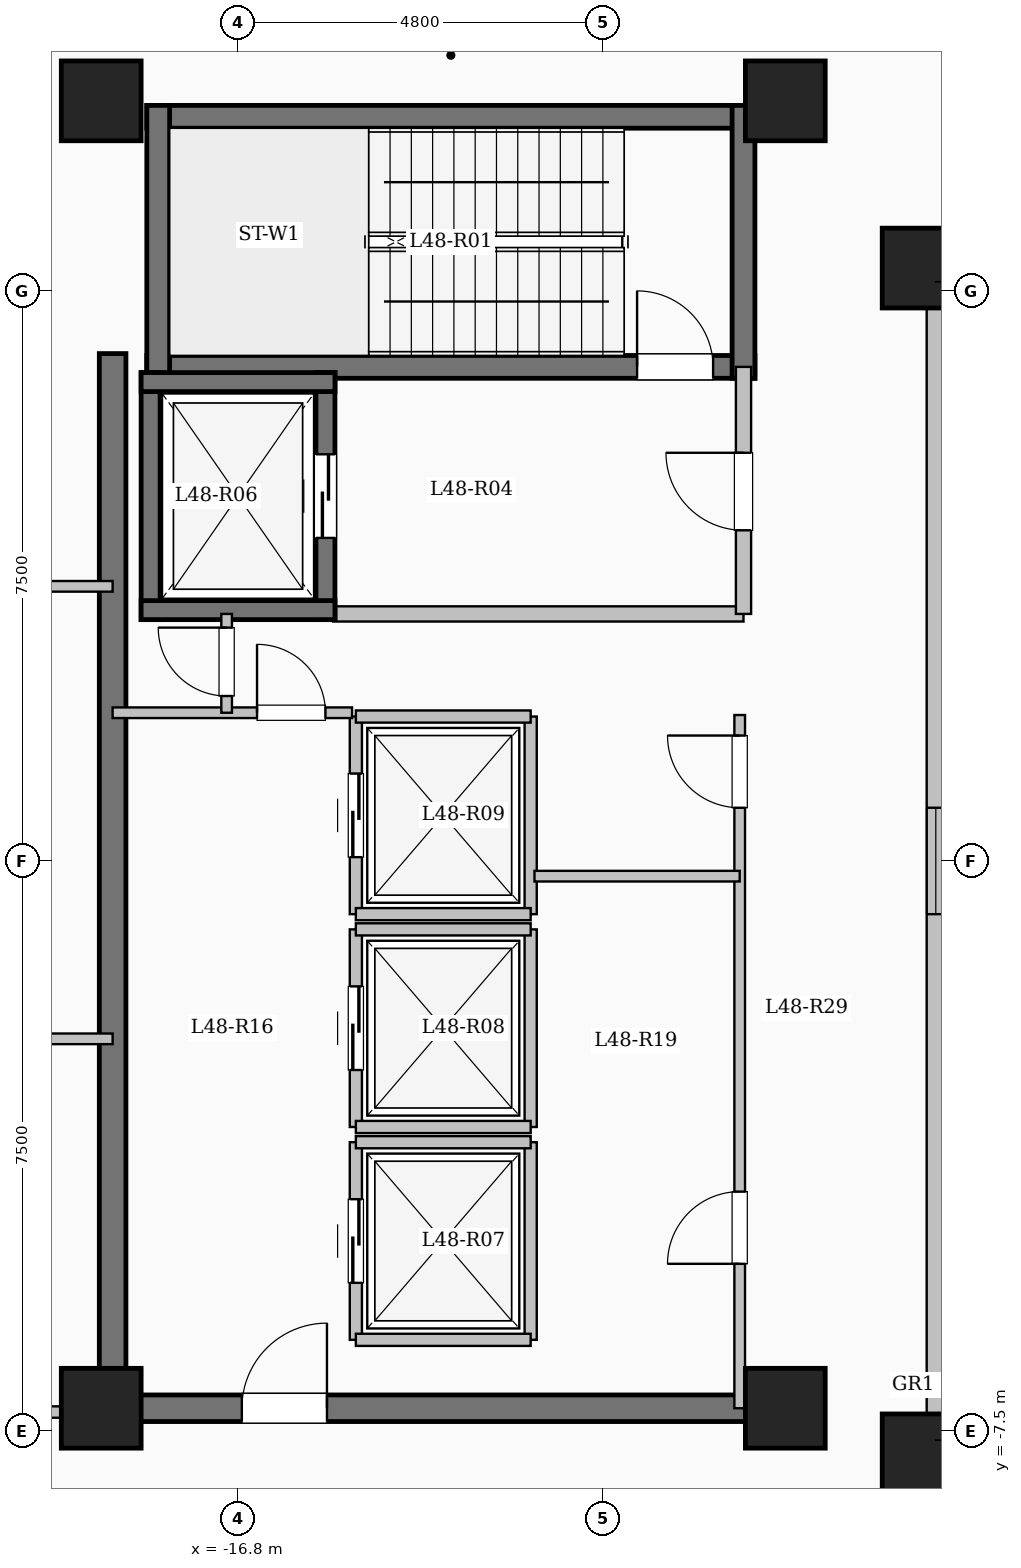
"""IFC4 building model, lengths in metres.
Left out: names, types, materials, properties, quantities, classifications, styles, units other than length and angle.
Written with IfcOpenShell. Run it as: python <this file> out.ifc"""

import sys

from ifc_helpers import new_model, si_unit, direction, frame, frame_2d, origin, origin_2d, place, context, subcontext, project, spatial, rectangle, extrude, element, fill, save


model = new_model("IFC4")
c1 = context("Model", 3, precision=1e-05, world=origin(), true_north=direction((0.0, 1.0)))
c2 = subcontext(c1, "Body", "Model", "MODEL_VIEW")
j1 = project(units=[si_unit("LENGTHUNIT", "METRE"), si_unit("PLANEANGLEUNIT", "RADIAN")], contexts=[c1])
p1 = place(None, origin())
s1 = spatial("IfcSite", under=j1, at=p1, CompositionType="ELEMENT")
p2 = place(p1, origin())
s2 = spatial("IfcBuilding", under=s1, at=p2, CompositionType="ELEMENT")
p3 = place(p2, frame((0.0, 0.0, 177.3)))
s3 = spatial("IfcBuildingStorey", under=s2, at=p3, CompositionType="ELEMENT", Elevation=177.3)
for number, where, z_axis, x_axis in (
    (1, (-7.8, -7.8, 0.0), (0.0, 0.0, 1.0), (1.0, 0.0, 0.0)),
    (2, (-7.8, 7.8, 0.0), (0.0, 0.0, 1.0), (1.0, 0.0, 0.0)),
    (3, (-9.6, -7.2, 0.0), (0.0, 0.0, 1.0), (1.0, 0.0, 0.0)),
    (4, (-9.6, 10.0, 0.0), (0.0, 0.0, 1.0), (1.0, 0.0, 0.0)),
    (5, (-18.6, -7.2, 0.0), (0.0, 0.0, 1.0), (1.0, 0.0, 0.0)),
    (6, (-18.6, 10.0, 0.0), (0.0, 0.0, 1.0), (1.0, 0.0, 0.0)),
):
    element("IfcColumn", number, at=place(p3, frame(where, z_axis=z_axis, x_axis=x_axis)), inside=s3, PredefinedType="COLUMN", context=c2, shape_type="SweptSolid", body=[
        extrude(rectangle(XDim=1.05, YDim=1.05, at=origin_2d()), origin(), (0.0, 0.0, 1.0), 4.5),
    ])
p4 = place(p3, frame((-7.62, 7.62, 0.0), z_axis=(0.0, 0.0, 1.0), x_axis=(0.0, -1.0, 0.0)))
e7 = element("IfcWall", 7, at=p4, inside=s3, PredefinedType="SOLIDWALL", context=c2, shape_type="SweptSolid", body=[
    extrude(rectangle(XDim=15.24, YDim=0.24, at=frame_2d((7.62, 0.0))), origin(), (0.0, 0.0, 1.0), 4.2),
])
p5 = place(p4, frame((6.92, 0.0, 0.95)))
e8 = element("IfcOpeningElement", 8, at=p5, cuts=e7, PredefinedType="OPENING", context=c2, shape_type="SweptSolid", body=[
    extrude(rectangle(XDim=1.4, YDim=1.5, at=frame_2d((0.7, 0.75))), frame((0.0, 0.13, 0.0), z_axis=(0.0, -1.0, 0.0), x_axis=(1.0, 0.0, 0.0)), (0.0, 0.0, 1.0), 0.26),
])
p6 = place(p3, frame((-18.0, 9.79, 0.0), z_axis=(0.0, 0.0, 1.0), x_axis=(1.0, 0.0, 0.0)))
e9 = element("IfcWall", 9, at=p6, inside=s3, PredefinedType="SHEAR", context=c2, shape_type="SweptSolid", body=[
    extrude(rectangle(XDim=8.0, YDim=0.3, at=frame_2d((4.0, 0.0))), origin(), (0.0, 0.0, 1.0), 4.5),
])
p7 = place(p3, frame((-18.0, 6.5, 0.0), z_axis=(0.0, 0.0, 1.0), x_axis=(1.0, 0.0, 0.0)))
e10 = element("IfcWall", 10, at=p7, inside=s3, PredefinedType="SHEAR", context=c2, shape_type="SweptSolid", body=[
    extrude(rectangle(XDim=8.0, YDim=0.3, at=frame_2d((4.0, 0.0))), origin(), (0.0, 0.0, 1.0), 4.5),
])
p8 = place(p7, frame((6.45, 0.0, 0.0)))
e11 = element("IfcOpeningElement", 11, at=p8, cuts=e10, PredefinedType="OPENING", context=c2, shape_type="SweptSolid", body=[
    extrude(rectangle(XDim=1.0, YDim=2.15, at=frame_2d((0.5, 1.075))), frame((0.0, 0.16, 0.0), z_axis=(0.0, -1.0, 0.0), x_axis=(1.0, 0.0, 0.0)), (0.0, 0.0, 1.0), 0.32),
])
for number, where, z_axis, x_axis in (
    (12, (-17.85, 6.35, 0.0), (0.0, 0.0, 1.0), (0.0, 1.0, 0.0)),
    (13, (-10.15, 6.35, 0.0), (0.0, 0.0, 1.0), (0.0, 1.0, 0.0)),
):
    element("IfcWall", number, at=place(p3, frame(where, z_axis=z_axis, x_axis=x_axis)), inside=s3, PredefinedType="SHEAR", context=c2, shape_type="SweptSolid", body=[
        extrude(rectangle(XDim=3.59, YDim=0.3, at=frame_2d((1.795, 0.0))), origin(), (0.0, 0.0, 1.0), 4.5),
    ])
p9 = place(p3, frame((-15.55, 3.25, 0.0), z_axis=(0.0, 0.0, 1.0), x_axis=(1.0, 0.0, 0.0)))
e14 = element("IfcWall", 14, at=p9, inside=s3, PredefinedType="SOLIDWALL", context=c2, shape_type="SweptSolid", body=[
    extrude(rectangle(XDim=5.4, YDim=0.2, at=frame_2d((2.7, 0.0))), origin(), (0.0, 0.0, 1.0), 4.2),
])
p10 = place(p3, frame((-10.15, 3.25, 0.0), z_axis=(0.0, 0.0, 1.0), x_axis=(0.0, 1.0, 0.0)))
e15 = element("IfcWall", 15, at=p10, inside=s3, PredefinedType="SOLIDWALL", context=c2, shape_type="SweptSolid", body=[
    extrude(rectangle(XDim=3.25, YDim=0.2, at=frame_2d((1.625, 0.0))), origin(), (0.0, 0.0, 1.0), 4.2),
])
p11 = place(p10, frame((1.1, 0.0, 0.0)))
e16 = element("IfcOpeningElement", 16, at=p11, cuts=e15, PredefinedType="OPENING", context=c2, shape_type="SweptSolid", body=[
    extrude(rectangle(XDim=1.02, YDim=2.15, at=frame_2d((0.51, 1.075))), frame((0.0, 0.11, 0.0), z_axis=(0.0, -1.0, 0.0), x_axis=(1.0, 0.0, 0.0)), (0.0, 0.0, 1.0), 0.22),
])
p12 = place(p3, frame((-17.95, 3.175, 0.0), z_axis=(0.0, 0.0, 1.0), x_axis=(0.0, 1.0, 0.0)))
e17 = element("IfcWall", 17, at=p12, inside=s3, PredefinedType="SHEAR", context=c2, shape_type="SweptSolid", body=[
    extrude(rectangle(XDim=3.25, YDim=0.25, at=frame_2d((1.625, 0.0))), origin(), (0.0, 0.0, 1.0), 4.5),
])
p13 = place(p3, frame((-15.65, 3.175, 0.0), z_axis=(0.0, 0.0, 1.0), x_axis=(0.0, 1.0, 0.0)))
e18 = element("IfcWall", 18, at=p13, inside=s3, PredefinedType="SHEAR", context=c2, shape_type="SweptSolid", body=[
    extrude(rectangle(XDim=3.25, YDim=0.25, at=frame_2d((1.625, 0.0))), origin(), (0.0, 0.0, 1.0), 4.5),
])
p14 = place(p13, frame((1.075, 0.0, 0.0)))
e19 = element("IfcOpeningElement", 19, at=p14, cuts=e18, PredefinedType="OPENING", context=c2, shape_type="SweptSolid", body=[
    extrude(rectangle(XDim=1.1, YDim=2.15, at=frame_2d((0.55, 1.075))), frame((0.0, 0.135, 0.0), z_axis=(0.0, -1.0, 0.0), x_axis=(1.0, 0.0, 0.0)), (0.0, 0.0, 1.0), 0.27),
])
for number, where, z_axis, x_axis in (
    (20, (-18.075, 3.3, 0.0), (0.0, 0.0, 1.0), (1.0, 0.0, 0.0)),
    (21, (-18.075, 6.3, 0.0), (0.0, 0.0, 1.0), (1.0, 0.0, 0.0)),
):
    element("IfcWall", number, at=place(p3, frame(where, z_axis=z_axis, x_axis=x_axis)), inside=s3, PredefinedType="SHEAR", context=c2, shape_type="SweptSolid", body=[
        extrude(rectangle(XDim=2.55, YDim=0.25, at=frame_2d((1.275, 0.0))), origin(), (0.0, 0.0, 1.0), 4.5),
    ])
p15 = place(p3, frame((-15.25, -6.3, 0.0), z_axis=(0.0, 0.0, 1.0), x_axis=(0.0, 1.0, 0.0)))
e22 = element("IfcWall", 22, at=p15, inside=s3, PredefinedType="SOLIDWALL", context=c2, shape_type="SweptSolid", body=[
    extrude(rectangle(XDim=2.6, YDim=0.16, at=frame_2d((1.3, 0.0))), origin(), (0.0, 0.0, 1.0), 4.2),
])
p16 = place(p15, frame((0.75, 0.0, 0.0)))
e23 = element("IfcOpeningElement", 23, at=p16, cuts=e22, PredefinedType="OPENING", context=c2, shape_type="SweptSolid", body=[
    extrude(rectangle(XDim=1.1, YDim=2.15, at=frame_2d((0.55, 1.075))), frame((0.0, 0.09, 0.0), z_axis=(0.0, -1.0, 0.0), x_axis=(1.0, 0.0, 0.0)), (0.0, 0.0, 1.0), 0.18),
])
p17 = place(p3, frame((-12.95, -6.3, 0.0), z_axis=(0.0, 0.0, 1.0), x_axis=(0.0, 1.0, 0.0)))
e24 = element("IfcWall", 24, at=p17, inside=s3, PredefinedType="SOLIDWALL", context=c2, shape_type="SweptSolid", body=[
    extrude(rectangle(XDim=2.6, YDim=0.16, at=frame_2d((1.3, 0.0))), origin(), (0.0, 0.0, 1.0), 4.2),
])
for number, where, z_axis, x_axis in (
    (25, (-15.25, -6.3, 0.0), (0.0, 0.0, 1.0), (1.0, 0.0, 0.0)),
    (26, (-15.25, -3.7, 0.0), (0.0, 0.0, 1.0), (1.0, 0.0, 0.0)),
):
    element("IfcWall", number, at=place(p3, frame(where, z_axis=z_axis, x_axis=x_axis)), inside=s3, PredefinedType="SOLIDWALL", context=c2, shape_type="SweptSolid", body=[
        extrude(rectangle(XDim=2.3, YDim=0.16, at=frame_2d((1.15, 0.0))), origin(), (0.0, 0.0, 1.0), 4.2),
    ])
p18 = place(p3, frame((-15.25, -3.5, 0.0), z_axis=(0.0, 0.0, 1.0), x_axis=(0.0, 1.0, 0.0)))
e27 = element("IfcWall", 27, at=p18, inside=s3, PredefinedType="SOLIDWALL", context=c2, shape_type="SweptSolid", body=[
    extrude(rectangle(XDim=2.6, YDim=0.16, at=frame_2d((1.3, 0.0))), origin(), (0.0, 0.0, 1.0), 4.2),
])
p19 = place(p18, frame((0.75, 0.0, 0.0)))
e28 = element("IfcOpeningElement", 28, at=p19, cuts=e27, PredefinedType="OPENING", context=c2, shape_type="SweptSolid", body=[
    extrude(rectangle(XDim=1.1, YDim=2.15, at=frame_2d((0.55, 1.075))), frame((0.0, 0.09, 0.0), z_axis=(0.0, -1.0, 0.0), x_axis=(1.0, 0.0, 0.0)), (0.0, 0.0, 1.0), 0.18),
])
p20 = place(p3, frame((-12.95, -3.5, 0.0), z_axis=(0.0, 0.0, 1.0), x_axis=(0.0, 1.0, 0.0)))
e29 = element("IfcWall", 29, at=p20, inside=s3, PredefinedType="SOLIDWALL", context=c2, shape_type="SweptSolid", body=[
    extrude(rectangle(XDim=2.6, YDim=0.16, at=frame_2d((1.3, 0.0))), origin(), (0.0, 0.0, 1.0), 4.2),
])
for number, where, z_axis, x_axis in (
    (30, (-15.25, -3.5, 0.0), (0.0, 0.0, 1.0), (1.0, 0.0, 0.0)),
    (31, (-15.25, -0.9, 0.0), (0.0, 0.0, 1.0), (1.0, 0.0, 0.0)),
):
    element("IfcWall", number, at=place(p3, frame(where, z_axis=z_axis, x_axis=x_axis)), inside=s3, PredefinedType="SOLIDWALL", context=c2, shape_type="SweptSolid", body=[
        extrude(rectangle(XDim=2.3, YDim=0.16, at=frame_2d((1.15, 0.0))), origin(), (0.0, 0.0, 1.0), 4.2),
    ])
p21 = place(p3, frame((-15.25, -0.7, 0.0), z_axis=(0.0, 0.0, 1.0), x_axis=(0.0, 1.0, 0.0)))
e32 = element("IfcWall", 32, at=p21, inside=s3, PredefinedType="SOLIDWALL", context=c2, shape_type="SweptSolid", body=[
    extrude(rectangle(XDim=2.6, YDim=0.16, at=frame_2d((1.3, 0.0))), origin(), (0.0, 0.0, 1.0), 4.2),
])
p22 = place(p21, frame((0.75, 0.0, 0.0)))
e33 = element("IfcOpeningElement", 33, at=p22, cuts=e32, PredefinedType="OPENING", context=c2, shape_type="SweptSolid", body=[
    extrude(rectangle(XDim=1.1, YDim=2.15, at=frame_2d((0.55, 1.075))), frame((0.0, 0.09, 0.0), z_axis=(0.0, -1.0, 0.0), x_axis=(1.0, 0.0, 0.0)), (0.0, 0.0, 1.0), 0.18),
])
p23 = place(p3, frame((-12.95, -0.7, 0.0), z_axis=(0.0, 0.0, 1.0), x_axis=(0.0, 1.0, 0.0)))
e34 = element("IfcWall", 34, at=p23, inside=s3, PredefinedType="SOLIDWALL", context=c2, shape_type="SweptSolid", body=[
    extrude(rectangle(XDim=2.6, YDim=0.16, at=frame_2d((1.3, 0.0))), origin(), (0.0, 0.0, 1.0), 4.2),
])
for number, where, z_axis, x_axis in (
    (35, (-15.25, -0.7, 0.0), (0.0, 0.0, 1.0), (1.0, 0.0, 0.0)),
    (36, (-15.25, 1.9, 0.0), (0.0, 0.0, 1.0), (1.0, 0.0, 0.0)),
):
    element("IfcWall", number, at=place(p3, frame(where, z_axis=z_axis, x_axis=x_axis)), inside=s3, PredefinedType="SOLIDWALL", context=c2, shape_type="SweptSolid", body=[
        extrude(rectangle(XDim=2.3, YDim=0.16, at=frame_2d((1.15, 0.0))), origin(), (0.0, 0.0, 1.0), 4.2),
    ])
p24 = place(p3, frame((-18.45, -7.375, 0.0), z_axis=(0.0, 0.0, 1.0), x_axis=(0.0, 1.0, 0.0)))
e37 = element("IfcWall", 37, at=p24, inside=s3, PredefinedType="SHEAR", context=c2, shape_type="SweptSolid", body=[
    extrude(rectangle(XDim=14.05, YDim=0.35, at=frame_2d((7.025, 0.0))), origin(), (0.0, 0.0, 1.0), 4.5),
])
p25 = place(p3, frame((-18.625, -7.2, 0.0), z_axis=(0.0, 0.0, 1.0), x_axis=(1.0, 0.0, 0.0)))
e38 = element("IfcWall", 38, at=p25, inside=s3, PredefinedType="SHEAR", context=c2, shape_type="SweptSolid", body=[
    extrude(rectangle(XDim=8.55, YDim=0.35, at=frame_2d((4.275, 0.0))), origin(), (0.0, 0.0, 1.0), 4.5),
])
p26 = place(p25, frame((1.875, 0.0, 0.0)))
e39 = element("IfcOpeningElement", 39, at=p26, cuts=e38, PredefinedType="OPENING", context=c2, shape_type="SweptSolid", body=[
    extrude(rectangle(XDim=1.12, YDim=2.15, at=frame_2d((0.56, 1.075))), frame((0.0, 0.185, 0.0), z_axis=(0.0, -1.0, 0.0), x_axis=(1.0, 0.0, 0.0)), (0.0, 0.0, 1.0), 0.37),
])
p27 = place(p3, frame((-18.45, 1.95, 0.0), z_axis=(0.0, 0.0, 1.0), x_axis=(1.0, 0.0, 0.0)))
e40 = element("IfcWall", 40, at=p27, inside=s3, PredefinedType="PARTITIONING", context=c2, shape_type="SweptSolid", body=[
    extrude(rectangle(XDim=3.15, YDim=0.14, at=frame_2d((1.575, 0.0))), origin(), (0.0, 0.0, 1.0), 4.2),
])
p28 = place(p27, frame((1.9, 0.0, 0.0)))
e41 = element("IfcOpeningElement", 41, at=p28, cuts=e40, PredefinedType="OPENING", context=c2, shape_type="SweptSolid", body=[
    extrude(rectangle(XDim=0.9, YDim=2.08, at=frame_2d((0.45, 1.04))), frame((0.0, 0.08, 0.0), z_axis=(0.0, -1.0, 0.0), x_axis=(1.0, 0.0, 0.0)), (0.0, 0.0, 1.0), 0.16),
])
p29 = place(p3, frame((-16.95, 1.95, 0.0), z_axis=(0.0, 0.0, 1.0), x_axis=(0.0, 1.0, 0.0)))
e42 = element("IfcWall", 42, at=p29, inside=s3, PredefinedType="PARTITIONING", context=c2, shape_type="SweptSolid", body=[
    extrude(rectangle(XDim=1.3, YDim=0.14, at=frame_2d((0.65, 0.0))), origin(), (0.0, 0.0, 1.0), 4.2),
])
p30 = place(p29, frame((0.22, 0.0, 0.0)))
e43 = element("IfcOpeningElement", 43, at=p30, cuts=e42, PredefinedType="OPENING", context=c2, shape_type="SweptSolid", body=[
    extrude(rectangle(XDim=0.9, YDim=2.08, at=frame_2d((0.45, 1.04))), frame((0.0, 0.08, 0.0), z_axis=(0.0, -1.0, 0.0), x_axis=(1.0, 0.0, 0.0)), (0.0, 0.0, 1.0), 0.16),
])
p31 = place(p3, frame((-10.2, -7.2, 0.0), z_axis=(0.0, 0.0, 1.0), x_axis=(0.0, 1.0, 0.0)))
e44 = element("IfcWall", 44, at=p31, inside=s3, PredefinedType="PARTITIONING", context=c2, shape_type="SweptSolid", body=[
    extrude(rectangle(XDim=9.12, YDim=0.14, at=frame_2d((4.56, 0.0))), origin(), (0.0, 0.0, 1.0), 4.2),
])
p32 = place(p31, frame((1.9, 0.0, 0.0)))
e45 = element("IfcOpeningElement", 45, at=p32, cuts=e44, PredefinedType="OPENING", context=c2, shape_type="SweptSolid", body=[
    extrude(rectangle(XDim=0.95, YDim=2.12, at=frame_2d((0.475, 1.06))), frame((0.0, 0.08, 0.0), z_axis=(0.0, -1.0, 0.0), x_axis=(1.0, 0.0, 0.0)), (0.0, 0.0, 1.0), 0.16),
])
p33 = place(p31, frame((7.9, 0.0, 0.0)))
e46 = element("IfcOpeningElement", 46, at=p33, cuts=e44, PredefinedType="OPENING", context=c2, shape_type="SweptSolid", body=[
    extrude(rectangle(XDim=0.95, YDim=2.12, at=frame_2d((0.475, 1.06))), frame((0.0, 0.08, 0.0), z_axis=(0.0, -1.0, 0.0), x_axis=(1.0, 0.0, 0.0)), (0.0, 0.0, 1.0), 0.16),
])
p34 = place(p3, frame((-12.9, -0.2, 0.0), z_axis=(0.0, 0.0, 1.0), x_axis=(1.0, 0.0, 0.0)))
e47 = element("IfcWall", 47, at=p34, inside=s3, PredefinedType="PARTITIONING", context=c2, shape_type="SweptSolid", body=[
    extrude(rectangle(XDim=2.7, YDim=0.14, at=frame_2d((1.35, 0.0))), origin(), (0.0, 0.0, 1.0), 4.2),
])
p35 = place(p3, frame((-25.08, -7.25, 0.0), z_axis=(0.0, 0.0, 1.0), x_axis=(1.0, 0.0, 0.0)))
e48 = element("IfcWall", 48, at=p35, inside=s3, PredefinedType="PARTITIONING", context=c2, shape_type="SweptSolid", body=[
    extrude(rectangle(XDim=6.63, YDim=0.15, at=frame_2d((3.315, 0.0))), origin(), (0.0, 0.0, 1.0), 4.2),
])
p36 = place(p35, frame((3.58, 0.0, 0.0)))
e49 = element("IfcOpeningElement", 49, at=p36, cuts=e48, PredefinedType="OPENING", context=c2, shape_type="SweptSolid", body=[
    extrude(rectangle(XDim=1.08, YDim=2.15, at=frame_2d((0.54, 1.075))), frame((0.0, 0.085, 0.0), z_axis=(0.0, -1.0, 0.0), x_axis=(1.0, 0.0, 0.0)), (0.0, 0.0, 1.0), 0.17),
])
p37 = place(p3, frame((-25.08, -2.34, 0.0), z_axis=(0.0, 0.0, 1.0), x_axis=(1.0, 0.0, 0.0)))
e50 = element("IfcWall", 50, at=p37, inside=s3, PredefinedType="PARTITIONING", context=c2, shape_type="SweptSolid", body=[
    extrude(rectangle(XDim=6.63, YDim=0.14, at=frame_2d((3.315, 0.0))), origin(), (0.0, 0.0, 1.0), 4.2),
])
p38 = place(p37, frame((4.48, 0.0, 0.0)))
e51 = element("IfcOpeningElement", 51, at=p38, cuts=e50, PredefinedType="OPENING", context=c2, shape_type="SweptSolid", body=[
    extrude(rectangle(XDim=1.08, YDim=2.15, at=frame_2d((0.54, 1.075))), frame((0.0, 0.08, 0.0), z_axis=(0.0, -1.0, 0.0), x_axis=(1.0, 0.0, 0.0)), (0.0, 0.0, 1.0), 0.16),
])
p39 = place(p3, frame((-25.08, 3.613, 0.0), z_axis=(0.0, 0.0, 1.0), x_axis=(1.0, 0.0, 0.0)))
e52 = element("IfcWall", 52, at=p39, inside=s3, PredefinedType="PARTITIONING", context=c2, shape_type="SweptSolid", body=[
    extrude(rectangle(XDim=6.63, YDim=0.14, at=frame_2d((3.315, 0.0))), origin(), (0.0, 0.0, 1.0), 4.2),
])
p40 = place(p39, frame((4.48, 0.0, 0.0)))
e53 = element("IfcOpeningElement", 53, at=p40, cuts=e52, PredefinedType="OPENING", context=c2, shape_type="SweptSolid", body=[
    extrude(rectangle(XDim=1.08, YDim=2.15, at=frame_2d((0.54, 1.075))), frame((0.0, 0.08, 0.0), z_axis=(0.0, -1.0, 0.0), x_axis=(1.0, 0.0, 0.0)), (0.0, 0.0, 1.0), 0.16),
])
p41 = place(p5, origin())
e54 = element("IfcWindow", 54, at=p41, inside=s3, PartitioningType="SINGLE_PANEL", PredefinedType="WINDOW", context=c2, shape_type="SweptSolid", body=[
    extrude(rectangle(XDim=1.4, YDim=1.5, at=frame_2d((0.7, 0.75))), frame((0.0, 0.03, 0.0), z_axis=(0.0, -1.0, 0.0), x_axis=(1.0, 0.0, 0.0)), (0.0, 0.0, 1.0), 0.06),
])
fill(e8, e54)
p42 = place(p8, origin())
e55 = element("IfcDoor", 55, at=p42, inside=s3, OperationType="SINGLE_SWING_LEFT", PredefinedType="DOOR", context=c2, shape_type="SweptSolid", body=[
    extrude(rectangle(XDim=1.0, YDim=2.15, at=frame_2d((0.5, 1.075))), frame((0.0, 0.025, 0.0), z_axis=(0.0, -1.0, 0.0), x_axis=(1.0, 0.0, 0.0)), (0.0, 0.0, 1.0), 0.05),
])
fill(e11, e55)
p43 = place(p11, origin())
e56 = element("IfcDoor", 56, at=p43, inside=s3, OperationType="SINGLE_SWING_RIGHT", PredefinedType="DOOR", context=c2, shape_type="SweptSolid", body=[
    extrude(rectangle(XDim=1.02, YDim=2.15, at=frame_2d((0.51, 1.075))), frame((0.0, 0.025, 0.0), z_axis=(0.0, -1.0, 0.0), x_axis=(1.0, 0.0, 0.0)), (0.0, 0.0, 1.0), 0.05),
])
fill(e16, e56)
p44 = place(p14, origin())
e57 = element("IfcDoor", 57, at=p44, inside=s3, OperationType="SLIDING_TO_LEFT", PredefinedType="DOOR", context=c2, shape_type="SweptSolid", body=[
    extrude(rectangle(XDim=1.1, YDim=2.15, at=frame_2d((0.55, 1.075))), frame((0.0, 0.025, 0.0), z_axis=(0.0, -1.0, 0.0), x_axis=(1.0, 0.0, 0.0)), (0.0, 0.0, 1.0), 0.05),
])
fill(e19, e57)
p45 = place(p16, origin())
e58 = element("IfcDoor", 58, at=p45, inside=s3, OperationType="SLIDING_TO_LEFT", PredefinedType="DOOR", context=c2, shape_type="SweptSolid", body=[
    extrude(rectangle(XDim=1.1, YDim=2.15, at=frame_2d((0.55, 1.075))), frame((0.0, 0.025, 0.0), z_axis=(0.0, -1.0, 0.0), x_axis=(1.0, 0.0, 0.0)), (0.0, 0.0, 1.0), 0.05),
])
fill(e23, e58)
p46 = place(p19, origin())
e59 = element("IfcDoor", 59, at=p46, inside=s3, OperationType="SLIDING_TO_LEFT", PredefinedType="DOOR", context=c2, shape_type="SweptSolid", body=[
    extrude(rectangle(XDim=1.1, YDim=2.15, at=frame_2d((0.55, 1.075))), frame((0.0, 0.025, 0.0), z_axis=(0.0, -1.0, 0.0), x_axis=(1.0, 0.0, 0.0)), (0.0, 0.0, 1.0), 0.05),
])
fill(e28, e59)
p47 = place(p22, origin())
e60 = element("IfcDoor", 60, at=p47, inside=s3, OperationType="SLIDING_TO_LEFT", PredefinedType="DOOR", context=c2, shape_type="SweptSolid", body=[
    extrude(rectangle(XDim=1.1, YDim=2.15, at=frame_2d((0.55, 1.075))), frame((0.0, 0.025, 0.0), z_axis=(0.0, -1.0, 0.0), x_axis=(1.0, 0.0, 0.0)), (0.0, 0.0, 1.0), 0.05),
])
fill(e33, e60)
p48 = place(p26, origin())
e61 = element("IfcDoor", 61, at=p48, inside=s3, OperationType="SINGLE_SWING_RIGHT", PredefinedType="DOOR", context=c2, shape_type="SweptSolid", body=[
    extrude(rectangle(XDim=1.12, YDim=2.15, at=frame_2d((0.56, 1.075))), frame((0.0, 0.025, 0.0), z_axis=(0.0, -1.0, 0.0), x_axis=(1.0, 0.0, 0.0)), (0.0, 0.0, 1.0), 0.05),
])
fill(e39, e61)
p49 = place(p28, origin())
e62 = element("IfcDoor", 62, at=p49, inside=s3, OperationType="SINGLE_SWING_LEFT", PredefinedType="DOOR", context=c2, shape_type="SweptSolid", body=[
    extrude(rectangle(XDim=0.9, YDim=2.08, at=frame_2d((0.45, 1.04))), frame((0.0, 0.025, 0.0), z_axis=(0.0, -1.0, 0.0), x_axis=(1.0, 0.0, 0.0)), (0.0, 0.0, 1.0), 0.05),
])
fill(e41, e62)
p50 = place(p30, origin())
e63 = element("IfcDoor", 63, at=p50, inside=s3, OperationType="SINGLE_SWING_RIGHT", PredefinedType="DOOR", context=c2, shape_type="SweptSolid", body=[
    extrude(rectangle(XDim=0.9, YDim=2.08, at=frame_2d((0.45, 1.04))), frame((0.0, 0.025, 0.0), z_axis=(0.0, -1.0, 0.0), x_axis=(1.0, 0.0, 0.0)), (0.0, 0.0, 1.0), 0.05),
])
fill(e43, e63)
p51 = place(p32, origin())
e64 = element("IfcDoor", 64, at=p51, inside=s3, OperationType="SINGLE_SWING_LEFT", PredefinedType="DOOR", context=c2, shape_type="SweptSolid", body=[
    extrude(rectangle(XDim=0.95, YDim=2.12, at=frame_2d((0.475, 1.06))), frame((0.0, 0.025, 0.0), z_axis=(0.0, -1.0, 0.0), x_axis=(1.0, 0.0, 0.0)), (0.0, 0.0, 1.0), 0.05),
])
fill(e45, e64)
p52 = place(p33, origin())
e65 = element("IfcDoor", 65, at=p52, inside=s3, OperationType="SINGLE_SWING_RIGHT", PredefinedType="DOOR", context=c2, shape_type="SweptSolid", body=[
    extrude(rectangle(XDim=0.95, YDim=2.12, at=frame_2d((0.475, 1.06))), frame((0.0, 0.025, 0.0), z_axis=(0.0, -1.0, 0.0), x_axis=(1.0, 0.0, 0.0)), (0.0, 0.0, 1.0), 0.05),
])
fill(e46, e65)
save(model, sys.argv[1])
